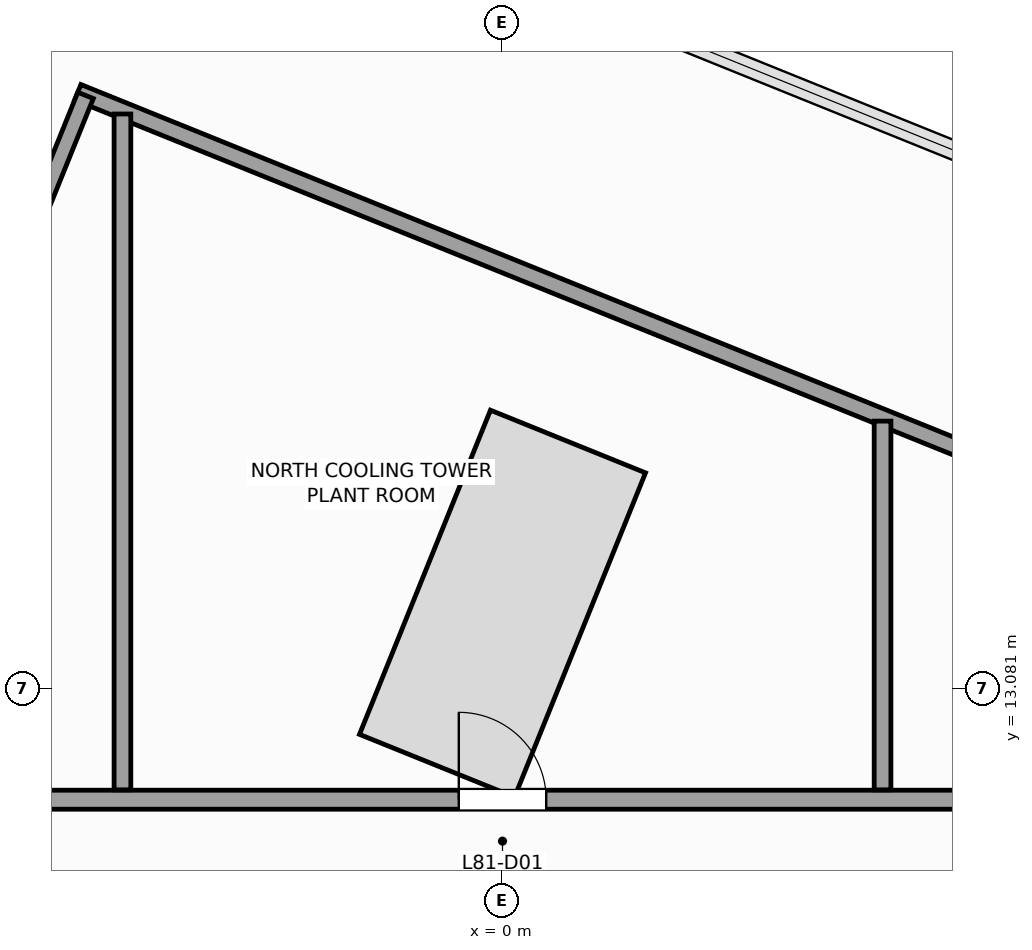
"""IFC4 building model, lengths in metres.
Left out: names, types, materials, properties, quantities, classifications, styles, units other than length and angle.
Written with IfcOpenShell. Run it as: python <this file> out.ifc"""

import sys

from ifc_helpers import new_model, si_unit, direction, frame, frame_2d, origin, place, context, subcontext, project, spatial, rectangle, extrude, source, transform, mapped, element, fill, save


model = new_model("IFC4")
c1 = context("Model", 3, precision=1e-05, world=origin(), true_north=direction((0.0, 1.0)))
c2 = subcontext(c1, "Body", "Model", "MODEL_VIEW")
j1 = project(units=[si_unit("LENGTHUNIT", "METRE"), si_unit("PLANEANGLEUNIT", "RADIAN")], contexts=[c1])
p1 = place(None, origin())
s1 = spatial("IfcSite", under=j1, at=p1, CompositionType="ELEMENT")
p2 = place(p1, origin())
s2 = spatial("IfcBuilding", under=s1, at=p2, CompositionType="ELEMENT")
p3 = place(p2, frame((0.0, 0.0, 329.6)))
s3 = spatial("IfcBuildingStorey", under=s2, at=p3, CompositionType="ELEMENT", Elevation=329.6)
p4 = place(p3, frame((18.556, 11.172, 0.0), z_axis=(0.0, 0.0, 1.0), x_axis=(-0.927181788521, 0.374611707018, 0.0)))
e1 = element("IfcWall", 1, at=p4, inside=s3, PredefinedType="PARTITIONING", context=c2, shape_type="SweptSolid", body=[
    extrude(rectangle(XDim=26.04, YDim=0.22, at=frame_2d((13.02, 0.0))), origin(), (0.0, 0.0, 1.0), 3.05),
])
p5 = place(p3, frame((-5.486, 20.886, 0.0), z_axis=(0.0, 0.0, 1.0), x_axis=(-0.374593321469, -0.927189216671, 0.0)))
e2 = element("IfcWall", 2, at=p5, inside=s3, PredefinedType="PARTITIONING", context=c2, shape_type="SweptSolid", body=[
    extrude(rectangle(XDim=4.4, YDim=0.22, at=frame_2d((2.2, 0.0))), origin(), (0.0, 0.0, 1.0), 3.7),
])
p6 = place(p3, frame((-10.32, 11.62, 0.0), z_axis=(0.0, 0.0, 1.0), x_axis=(1.0, 0.0, 0.0)))
e3 = element("IfcWall", 3, at=p6, inside=s3, PredefinedType="PARTITIONING", context=c2, shape_type="SweptSolid", body=[
    extrude(rectangle(XDim=21.94, YDim=0.25, at=frame_2d((10.97, 0.0))), origin(), (0.0, 0.0, 1.0), 3.7),
])
p7 = place(p6, frame((9.745, 0.0, 0.0)))
e4 = element("IfcOpeningElement", 4, at=p7, cuts=e3, PredefinedType="OPENING", context=c2, shape_type="SweptSolid", body=[
    extrude(rectangle(XDim=1.15, YDim=2.25, at=frame_2d((0.575, 1.125))), frame((0.0, 0.135, 0.0), z_axis=(0.0, -1.0, 0.0), x_axis=(1.0, 0.0, 0.0)), (0.0, 0.0, 1.0), 0.27),
])
p8 = place(p3, frame((-5.0, 11.75, 0.0), z_axis=(0.0, 0.0, 1.0), x_axis=(0.0, 1.0, 0.0)))
e5 = element("IfcWall", 5, at=p8, inside=s3, PredefinedType="PARTITIONING", context=c2, shape_type="SweptSolid", body=[
    extrude(rectangle(XDim=8.891, YDim=0.22, at=frame_2d((4.446, 0.0))), origin(), (0.0, 0.0, 1.0), 3.7),
])
p9 = place(p3, frame((5.0, 11.75, 0.0), z_axis=(0.0, 0.0, 1.0), x_axis=(0.0, 1.0, 0.0)))
e6 = element("IfcWall", 6, at=p9, inside=s3, PredefinedType="PARTITIONING", context=c2, shape_type="SweptSolid", body=[
    extrude(rectangle(XDim=4.851, YDim=0.22, at=frame_2d((2.425, 0.0))), origin(), (0.0, 0.0, 1.0), 3.7),
])
m1 = source(origin(), c2, "Body", "SweptSolid", [
    extrude(rectangle(XDim=1.15, YDim=2.25, at=frame_2d((0.575, 1.125))), frame((0.0, 0.025, 0.0), z_axis=(0.0, -1.0, 0.0), x_axis=(1.0, 0.0, 0.0)), (0.0, 0.0, 1.0), 0.05),
])
p10 = place(p7, origin())
e7 = element("IfcDoor", 7, at=p10, inside=s3, OperationType="SINGLE_SWING_LEFT", PredefinedType="DOOR", context=c2, shape_type="MappedRepresentation", body=[
    mapped(m1, transform((0.0, 0.0, 0.0), scale=1.0)),
])
fill(e4, e7)
save(model, sys.argv[1])
